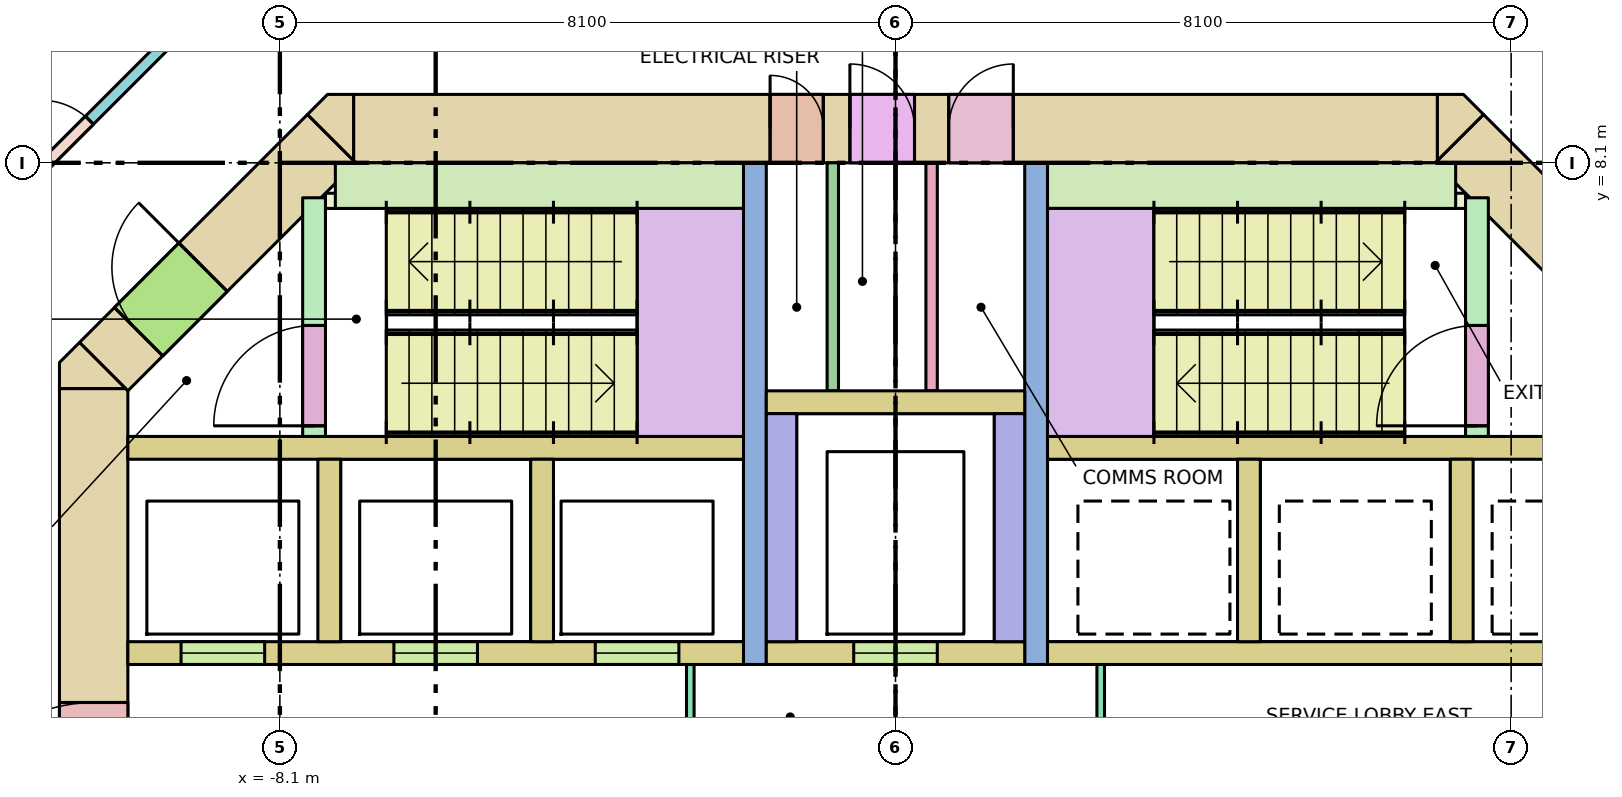
"""IFC4 building model, lengths in metres.
Left out: names, types, materials, properties, quantities, classifications, styles, units other than length and angle.
Written with IfcOpenShell. Run it as: python <this file> out.ifc"""

import sys

from ifc_helpers import new_model, si_unit, direction, frame, frame_2d, origin, place, context, subcontext, project, spatial, polyline, rectangle, outline, extrude, element, fill, save


model = new_model("IFC4")
c1 = context("Model", 3, precision=1e-05, world=origin(), true_north=direction((0.0, 1.0)))
c2 = subcontext(c1, "Body", "Model", "MODEL_VIEW")
j1 = project(units=[si_unit("LENGTHUNIT", "METRE"), si_unit("PLANEANGLEUNIT", "RADIAN")], contexts=[c1])
p1 = place(None, origin())
s1 = spatial("IfcSite", under=j1, at=p1, CompositionType="ELEMENT")
p2 = place(p1, origin())
s2 = spatial("IfcBuilding", under=s1, at=p2, CompositionType="ELEMENT")
p3 = place(p2, frame((0.0, 0.0, 39.0)))
s3 = spatial("IfcBuildingStorey", under=s2, at=p3, CompositionType="ELEMENT", Elevation=39.0)
p4 = place(p3, frame((-7.13, 8.55, -0.28), z_axis=(0.0, 0.0, 1.0), x_axis=(1.0, 0.0, 0.0)))
e1 = element("IfcWall", 1, at=p4, inside=s3, PredefinedType="SHEAR", context=c2, shape_type="SweptSolid", body=[
    extrude(rectangle(XDim=14.26, YDim=0.9, at=frame_2d((7.13, 0.0))), origin(), (0.0, 0.0, 1.0), 4.0),
])
p5 = place(p4, frame((5.48, 0.0, 0.28)))
e2 = element("IfcOpeningElement", 2, at=p5, cuts=e1, PredefinedType="OPENING", context=c2, shape_type="SweptSolid", body=[
    extrude(rectangle(XDim=0.7, YDim=2.1, at=frame_2d((0.35, 1.05))), frame((0.0, 0.46, 0.0), z_axis=(0.0, -1.0, 0.0), x_axis=(1.0, 0.0, 0.0)), (0.0, 0.0, 1.0), 0.92),
])
p6 = place(p4, frame((6.53, 0.0, 0.28)))
e3 = element("IfcOpeningElement", 3, at=p6, cuts=e1, PredefinedType="OPENING", context=c2, shape_type="SweptSolid", body=[
    extrude(rectangle(XDim=0.85, YDim=2.1, at=frame_2d((0.425, 1.05))), frame((0.0, 0.46, 0.0), z_axis=(0.0, -1.0, 0.0), x_axis=(1.0, 0.0, 0.0)), (0.0, 0.0, 1.0), 0.92),
])
p7 = place(p4, frame((7.83, 0.0, 0.28)))
e4 = element("IfcOpeningElement", 4, at=p7, cuts=e1, PredefinedType="OPENING", context=c2, shape_type="SweptSolid", body=[
    extrude(rectangle(XDim=0.85, YDim=2.1, at=frame_2d((0.425, 1.05))), frame((0.0, 0.46, 0.0), z_axis=(0.0, -1.0, 0.0), x_axis=(1.0, 0.0, 0.0)), (0.0, 0.0, 1.0), 0.92),
])
p8 = place(p3, frame((-10.55, -5.13, -0.28), z_axis=(0.0, 0.0, 1.0), x_axis=(0.0, 1.0, 0.0)))
e5 = element("IfcWall", 5, at=p8, inside=s3, PredefinedType="SHEAR", context=c2, shape_type="SweptSolid", body=[
    extrude(rectangle(XDim=10.26, YDim=0.9, at=frame_2d((5.13, 0.0))), origin(), (0.0, 0.0, 1.0), 4.0),
])
p9 = place(p8, frame((4.13, 0.0, 0.28)))
e6 = element("IfcOpeningElement", 6, at=p9, cuts=e5, PredefinedType="OPENING", context=c2, shape_type="SweptSolid", body=[
    extrude(rectangle(XDim=2.0, YDim=2.1, at=frame_2d((1.0, 1.05))), frame((0.0, 0.46, 0.0), z_axis=(0.0, -1.0, 0.0), x_axis=(1.0, 0.0, 0.0)), (0.0, 0.0, 1.0), 0.92),
])
p10 = place(p3, frame((-10.418, 5.418, -0.28), z_axis=(0.0, 0.0, 1.0), x_axis=(0.707106781187, 0.707106781187, 0.0)))
e7 = element("IfcWall", 7, at=p10, inside=s3, PredefinedType="SHEAR", context=c2, shape_type="SweptSolid", body=[
    extrude(rectangle(XDim=4.243, YDim=0.9, at=frame_2d((2.121, 0.0))), origin(), (0.0, 0.0, 1.0), 4.0),
])
p11 = place(p10, frame((0.65, 0.0, 0.28)))
e8 = element("IfcOpeningElement", 8, at=p11, cuts=e7, PredefinedType="OPENING", context=c2, shape_type="SweptSolid", body=[
    extrude(rectangle(XDim=1.2, YDim=2.1, at=frame_2d((0.6, 1.05))), frame((0.0, 0.46, 0.0), z_axis=(0.0, -1.0, 0.0), x_axis=(1.0, 0.0, 0.0)), (0.0, 0.0, 1.0), 0.92),
])
p12 = place(p3, frame((7.418, 8.418, -0.28), z_axis=(0.0, 0.0, 1.0), x_axis=(0.707106781187, -0.707106781187, 0.0)))
e9 = element("IfcWall", 9, at=p12, inside=s3, PredefinedType="SHEAR", context=c2, shape_type="SweptSolid", body=[
    extrude(rectangle(XDim=4.243, YDim=0.9, at=frame_2d((2.121, 0.0))), origin(), (0.0, 0.0, 1.0), 4.0),
])
p13 = place(p12, frame((2.393, 0.0, 0.28)))
e10 = element("IfcOpeningElement", 10, at=p13, cuts=e9, PredefinedType="OPENING", context=c2, shape_type="SweptSolid", body=[
    extrude(rectangle(XDim=1.2, YDim=2.1, at=frame_2d((0.6, 1.05))), frame((0.0, 0.46, 0.0), z_axis=(0.0, -1.0, 0.0), x_axis=(1.0, 0.0, 0.0)), (0.0, 0.0, 1.0), 0.92),
])
p14 = place(p3, frame((0.0, 0.0, -0.28)))
e11 = element("IfcWall", 11, at=p14, inside=s3, PredefinedType="SHEAR", context=c2, shape_type="SweptSolid", body=[
    extrude(outline(polyline([(-10.736, 5.736), (-10.13, 5.13), (-11.0, 5.13), (-11.0, 5.473), (-10.736, 5.736)])), origin(), (0.0, 0.0, 1.0), 4.0),
])
p15 = place(p3, frame((0.0, 0.0, -0.28)))
e12 = element("IfcWall", 12, at=p15, inside=s3, PredefinedType="SHEAR", context=c2, shape_type="SweptSolid", body=[
    extrude(outline(polyline([(-7.473, 9.0), (-7.13, 9.0), (-7.13, 8.13), (-7.736, 8.736), (-7.473, 9.0)])), origin(), (0.0, 0.0, 1.0), 4.0),
])
p16 = place(p3, frame((0.0, 0.0, -0.28)))
e13 = element("IfcWall", 13, at=p16, inside=s3, PredefinedType="SHEAR", context=c2, shape_type="SweptSolid", body=[
    extrude(outline(polyline([(7.473, 9.0), (7.736, 8.736), (7.13, 8.13), (7.13, 9.0), (7.473, 9.0)])), origin(), (0.0, 0.0, 1.0), 4.0),
])
for number, where, z_axis, x_axis in (
    (14, (-10.1, 4.35, 0.0), (0.0, 0.0, 1.0), (1.0, 0.0, 0.0)),
    (15, (2.0, 4.35, 0.0), (0.0, 0.0, 1.0), (1.0, 0.0, 0.0)),
):
    element("IfcWall", number, at=place(p3, frame(where, z_axis=z_axis, x_axis=x_axis)), inside=s3, PredefinedType="SOLIDWALL", context=c2, shape_type="SweptSolid", body=[
        extrude(rectangle(XDim=8.1, YDim=0.3, at=frame_2d((4.05, 0.0))), origin(), (0.0, 0.0, 1.0), 3.72),
    ])
p17 = place(p3, frame((-10.1, 1.65, 0.0), z_axis=(0.0, 0.0, 1.0), x_axis=(1.0, 0.0, 0.0)))
e16 = element("IfcWall", 16, at=p17, inside=s3, PredefinedType="SOLIDWALL", context=c2, shape_type="SweptSolid", body=[
    extrude(rectangle(XDim=8.1, YDim=0.3, at=frame_2d((4.05, 0.0))), origin(), (0.0, 0.0, 1.0), 3.72),
])
p18 = place(p17, frame((0.7, 0.0, 0.0)))
e17 = element("IfcOpeningElement", 17, at=p18, cuts=e16, PredefinedType="OPENING", context=c2, shape_type="SweptSolid", body=[
    extrude(rectangle(XDim=1.1, YDim=2.1, at=frame_2d((0.55, 1.05))), frame((0.0, 0.16, 0.0), z_axis=(0.0, -1.0, 0.0), x_axis=(1.0, 0.0, 0.0)), (0.0, 0.0, 1.0), 0.32),
])
p19 = place(p17, frame((3.5, 0.0, 0.0)))
e18 = element("IfcOpeningElement", 18, at=p19, cuts=e16, PredefinedType="OPENING", context=c2, shape_type="SweptSolid", body=[
    extrude(rectangle(XDim=1.1, YDim=2.1, at=frame_2d((0.55, 1.05))), frame((0.0, 0.16, 0.0), z_axis=(0.0, -1.0, 0.0), x_axis=(1.0, 0.0, 0.0)), (0.0, 0.0, 1.0), 0.32),
])
p20 = place(p17, frame((6.15, 0.0, 0.0)))
e19 = element("IfcOpeningElement", 19, at=p20, cuts=e16, PredefinedType="OPENING", context=c2, shape_type="SweptSolid", body=[
    extrude(rectangle(XDim=1.1, YDim=2.1, at=frame_2d((0.55, 1.05))), frame((0.0, 0.16, 0.0), z_axis=(0.0, -1.0, 0.0), x_axis=(1.0, 0.0, 0.0)), (0.0, 0.0, 1.0), 0.32),
])
p21 = place(p3, frame((2.0, 1.65, 0.0), z_axis=(0.0, 0.0, 1.0), x_axis=(1.0, 0.0, 0.0)))
e20 = element("IfcWall", 20, at=p21, inside=s3, PredefinedType="SOLIDWALL", context=c2, shape_type="SweptSolid", body=[
    extrude(rectangle(XDim=8.1, YDim=0.3, at=frame_2d((4.05, 0.0))), origin(), (0.0, 0.0, 1.0), 3.72),
])
for number, where, z_axis, x_axis in (
    (21, (-7.45, 1.8, 0.0), (0.0, 0.0, 1.0), (0.0, 1.0, 0.0)),
    (22, (-4.65, 1.8, 0.0), (0.0, 0.0, 1.0), (0.0, 1.0, 0.0)),
    (23, (4.65, 1.8, 0.0), (0.0, 0.0, 1.0), (0.0, 1.0, 0.0)),
    (24, (7.45, 1.8, 0.0), (0.0, 0.0, 1.0), (0.0, 1.0, 0.0)),
):
    element("IfcWall", number, at=place(p3, frame(where, z_axis=z_axis, x_axis=x_axis)), inside=s3, PredefinedType="SOLIDWALL", context=c2, shape_type="SweptSolid", body=[
        extrude(rectangle(XDim=2.4, YDim=0.3, at=frame_2d((1.2, 0.0))), origin(), (0.0, 0.0, 1.0), 3.72),
    ])
for number, where, z_axis, x_axis in (
    (25, (-1.85, 1.5, 0.0), (0.0, 0.0, 1.0), (0.0, 1.0, 0.0)),
    (26, (1.85, 1.5, 0.0), (0.0, 0.0, 1.0), (0.0, 1.0, 0.0)),
):
    element("IfcWall", number, at=place(p3, frame(where, z_axis=z_axis, x_axis=x_axis)), inside=s3, PredefinedType="SHEAR", context=c2, shape_type="SweptSolid", body=[
        extrude(rectangle(XDim=6.6, YDim=0.3, at=frame_2d((3.3, 0.0))), origin(), (0.0, 0.0, 1.0), 3.72),
    ])
p22 = place(p3, frame((-1.7, 1.65, 0.0), z_axis=(0.0, 0.0, 1.0), x_axis=(1.0, 0.0, 0.0)))
e27 = element("IfcWall", 27, at=p22, inside=s3, PredefinedType="SOLIDWALL", context=c2, shape_type="SweptSolid", body=[
    extrude(rectangle(XDim=3.4, YDim=0.3, at=frame_2d((1.7, 0.0))), origin(), (0.0, 0.0, 1.0), 3.72),
])
p23 = place(p22, frame((1.15, 0.0, 0.0)))
e28 = element("IfcOpeningElement", 28, at=p23, cuts=e27, PredefinedType="OPENING", context=c2, shape_type="SweptSolid", body=[
    extrude(rectangle(XDim=1.1, YDim=2.1, at=frame_2d((0.55, 1.05))), frame((0.0, 0.16, 0.0), z_axis=(0.0, -1.0, 0.0), x_axis=(1.0, 0.0, 0.0)), (0.0, 0.0, 1.0), 0.32),
])
for number, where, z_axis, x_axis in (
    (29, (-1.5, 1.8, 0.0), (0.0, 0.0, 1.0), (0.0, 1.0, 0.0)),
    (30, (1.5, 1.8, 0.0), (0.0, 0.0, 1.0), (0.0, 1.0, 0.0)),
):
    element("IfcWall", number, at=place(p3, frame(where, z_axis=z_axis, x_axis=x_axis)), inside=s3, PredefinedType="SOLIDWALL", context=c2, shape_type="SweptSolid", body=[
        extrude(rectangle(XDim=3.0, YDim=0.4, at=frame_2d((1.5, 0.0))), origin(), (0.0, 0.0, 1.0), 3.72),
    ])
p24 = place(p3, frame((-1.7, 4.95, 0.0), z_axis=(0.0, 0.0, 1.0), x_axis=(1.0, 0.0, 0.0)))
e31 = element("IfcWall", 31, at=p24, inside=s3, PredefinedType="SOLIDWALL", context=c2, shape_type="SweptSolid", body=[
    extrude(rectangle(XDim=3.4, YDim=0.3, at=frame_2d((1.7, 0.0))), origin(), (0.0, 0.0, 1.0), 3.72),
])
p25 = place(p3, frame((-7.65, 4.5, 0.0), z_axis=(0.0, 0.0, 1.0), x_axis=(0.0, 1.0, 0.0)))
e32 = element("IfcWall", 32, at=p25, inside=s3, PredefinedType="SHEAR", context=c2, shape_type="SweptSolid", body=[
    extrude(rectangle(XDim=3.14, YDim=0.3, at=frame_2d((1.57, 0.0))), origin(), (0.0, 0.0, 1.0), 3.72),
])
p26 = place(p25, frame((0.14, 0.0, 0.0)))
e33 = element("IfcOpeningElement", 33, at=p26, cuts=e32, PredefinedType="OPENING", context=c2, shape_type="SweptSolid", body=[
    extrude(rectangle(XDim=1.32, YDim=2.1, at=frame_2d((0.66, 1.05))), frame((0.0, 0.16, 0.0), z_axis=(0.0, -1.0, 0.0), x_axis=(1.0, 0.0, 0.0)), (0.0, 0.0, 1.0), 0.32),
])
p27 = place(p3, frame((-7.37, 7.8, 0.0), z_axis=(0.0, 0.0, 1.0), x_axis=(1.0, 0.0, 0.0)))
e34 = element("IfcWall", 34, at=p27, inside=s3, PredefinedType="SHEAR", context=c2, shape_type="SweptSolid", body=[
    extrude(rectangle(XDim=5.37, YDim=0.6, at=frame_2d((2.685, 0.0))), origin(), (0.0, 0.0, 1.0), 3.72),
])
p28 = place(p3, frame((7.65, 4.5, 0.0), z_axis=(0.0, 0.0, 1.0), x_axis=(0.0, 1.0, 0.0)))
e35 = element("IfcWall", 35, at=p28, inside=s3, PredefinedType="SHEAR", context=c2, shape_type="SweptSolid", body=[
    extrude(rectangle(XDim=3.14, YDim=0.3, at=frame_2d((1.57, 0.0))), origin(), (0.0, 0.0, 1.0), 3.72),
])
p29 = place(p28, frame((0.14, 0.0, 0.0)))
e36 = element("IfcOpeningElement", 36, at=p29, cuts=e35, PredefinedType="OPENING", context=c2, shape_type="SweptSolid", body=[
    extrude(rectangle(XDim=1.32, YDim=2.1, at=frame_2d((0.66, 1.05))), frame((0.0, 0.16, 0.0), z_axis=(0.0, -1.0, 0.0), x_axis=(1.0, 0.0, 0.0)), (0.0, 0.0, 1.0), 0.32),
])
p30 = place(p3, frame((2.0, 7.8, 0.0), z_axis=(0.0, 0.0, 1.0), x_axis=(1.0, 0.0, 0.0)))
e37 = element("IfcWall", 37, at=p30, inside=s3, PredefinedType="SHEAR", context=c2, shape_type="SweptSolid", body=[
    extrude(rectangle(XDim=5.37, YDim=0.6, at=frame_2d((2.685, 0.0))), origin(), (0.0, 0.0, 1.0), 3.72),
])
for number, where, z_axis, x_axis in (
    (38, (-7.5, 7.6, 0.0), (0.0, 0.0, 1.0), (1.0, 0.0, 0.0)),
    (39, (6.9, 7.6, 0.0), (0.0, 0.0, 1.0), (1.0, 0.0, 0.0)),
):
    element("IfcWall", number, at=place(p3, frame(where, z_axis=z_axis, x_axis=x_axis)), inside=s3, PredefinedType="SHEAR", context=c2, shape_type="SweptSolid", body=[
        extrude(rectangle(XDim=0.6, YDim=0.2, at=frame_2d((0.3, 0.0))), origin(), (0.0, 0.0, 1.0), 3.72),
    ])
p31 = place(p3, frame((-2.7, -1.5, 0.0), z_axis=(0.0, 0.0, 1.0), x_axis=(0.0, 1.0, 0.0)))
e40 = element("IfcWall", 40, at=p31, inside=s3, PredefinedType="PARTITIONING", context=c2, shape_type="SweptSolid", body=[
    extrude(rectangle(XDim=3.0, YDim=0.1, at=frame_2d((1.5, 0.0))), origin(), (0.0, 0.0, 1.0), 3.72),
])
p32 = place(p31, frame((0.9, 0.0, 0.0)))
e41 = element("IfcOpeningElement", 41, at=p32, cuts=e40, PredefinedType="OPENING", context=c2, shape_type="SweptSolid", body=[
    extrude(rectangle(XDim=1.2, YDim=2.1, at=frame_2d((0.6, 1.05))), frame((0.0, 0.06, 0.0), z_axis=(0.0, -1.0, 0.0), x_axis=(1.0, 0.0, 0.0)), (0.0, 0.0, 1.0), 0.12),
])
p33 = place(p3, frame((2.7, -1.5, 0.0), z_axis=(0.0, 0.0, 1.0), x_axis=(0.0, 1.0, 0.0)))
e42 = element("IfcWall", 42, at=p33, inside=s3, PredefinedType="PARTITIONING", context=c2, shape_type="SweptSolid", body=[
    extrude(rectangle(XDim=3.0, YDim=0.1, at=frame_2d((1.5, 0.0))), origin(), (0.0, 0.0, 1.0), 3.72),
])
p34 = place(p33, frame((0.9, 0.0, 0.0)))
e43 = element("IfcOpeningElement", 43, at=p34, cuts=e42, PredefinedType="OPENING", context=c2, shape_type="SweptSolid", body=[
    extrude(rectangle(XDim=1.2, YDim=2.1, at=frame_2d((0.6, 1.05))), frame((0.0, 0.06, 0.0), z_axis=(0.0, -1.0, 0.0), x_axis=(1.0, 0.0, 0.0)), (0.0, 0.0, 1.0), 0.12),
])
for number, where, z_axis, x_axis in (
    (44, (-0.825, 5.1, 0.0), (0.0, 0.0, 1.0), (0.0, 1.0, 0.0)),
    (45, (0.475, 5.1, 0.0), (0.0, 0.0, 1.0), (0.0, 1.0, 0.0)),
):
    element("IfcWall", number, at=place(p3, frame(where, z_axis=z_axis, x_axis=x_axis)), inside=s3, PredefinedType="PARTITIONING", context=c2, shape_type="SweptSolid", body=[
        extrude(rectangle(XDim=3.0, YDim=0.15, at=frame_2d((1.5, 0.0))), origin(), (0.0, 0.0, 1.0), 3.72),
    ])
p35 = place(p3, frame((-12.975, 6.291, 0.0), z_axis=(0.0, 0.0, 1.0), x_axis=(0.707125355289, 0.707088206597, 0.0)))
e46 = element("IfcWall", 46, at=p35, inside=s3, PredefinedType="PARTITIONING", context=c2, shape_type="SweptSolid", body=[
    extrude(rectangle(XDim=6.572, YDim=0.15, at=frame_2d((3.286, 0.0))), origin(), (0.0, 0.0, 1.0), 2.82),
])
p36 = place(p35, frame((2.45, 0.0, 0.0)))
e47 = element("IfcOpeningElement", 47, at=p36, cuts=e46, PredefinedType="OPENING", context=c2, shape_type="SweptSolid", body=[
    extrude(rectangle(XDim=0.9, YDim=2.1, at=frame_2d((0.45, 1.05))), frame((0.0, 0.085, 0.0), z_axis=(0.0, -1.0, 0.0), x_axis=(1.0, 0.0, 0.0)), (0.0, 0.0, 1.0), 0.17),
])
p37 = place(p3, frame((8.328, 10.938, 0.0), z_axis=(0.0, 0.0, 1.0), x_axis=(0.707106781187, -0.707106781187, 0.0)))
e48 = element("IfcWall", 48, at=p37, inside=s3, PredefinedType="PARTITIONING", context=c2, shape_type="SweptSolid", body=[
    extrude(rectangle(XDim=5.496, YDim=0.15, at=frame_2d((2.748, 0.0))), origin(), (0.0, 0.0, 1.0), 2.82),
])
p38 = place(p37, frame((3.196, 0.0, 0.0)))
e49 = element("IfcOpeningElement", 49, at=p38, cuts=e48, PredefinedType="OPENING", context=c2, shape_type="SweptSolid", body=[
    extrude(rectangle(XDim=0.9, YDim=2.1, at=frame_2d((0.45, 1.05))), frame((0.0, 0.085, 0.0), z_axis=(0.0, -1.0, 0.0), x_axis=(1.0, 0.0, 0.0)), (0.0, 0.0, 1.0), 0.17),
])
p39 = place(p18, origin())
e50 = element("IfcDoor", 50, at=p39, inside=s3, OperationType="DOUBLE_DOOR_SLIDING", PredefinedType="DOOR", context=c2, shape_type="SweptSolid", body=[
    extrude(rectangle(XDim=1.1, YDim=2.1, at=frame_2d((0.55, 1.05))), frame((0.0, 0.025, 0.0), z_axis=(0.0, -1.0, 0.0), x_axis=(1.0, 0.0, 0.0)), (0.0, 0.0, 1.0), 0.05),
])
fill(e17, e50)
p40 = place(p19, origin())
e51 = element("IfcDoor", 51, at=p40, inside=s3, OperationType="DOUBLE_DOOR_SLIDING", PredefinedType="DOOR", context=c2, shape_type="SweptSolid", body=[
    extrude(rectangle(XDim=1.1, YDim=2.1, at=frame_2d((0.55, 1.05))), frame((0.0, 0.025, 0.0), z_axis=(0.0, -1.0, 0.0), x_axis=(1.0, 0.0, 0.0)), (0.0, 0.0, 1.0), 0.05),
])
fill(e18, e51)
p41 = place(p20, origin())
e52 = element("IfcDoor", 52, at=p41, inside=s3, OperationType="DOUBLE_DOOR_SLIDING", PredefinedType="DOOR", context=c2, shape_type="SweptSolid", body=[
    extrude(rectangle(XDim=1.1, YDim=2.1, at=frame_2d((0.55, 1.05))), frame((0.0, 0.025, 0.0), z_axis=(0.0, -1.0, 0.0), x_axis=(1.0, 0.0, 0.0)), (0.0, 0.0, 1.0), 0.05),
])
fill(e19, e52)
p42 = place(p23, origin())
e53 = element("IfcDoor", 53, at=p42, inside=s3, OperationType="DOUBLE_DOOR_SLIDING", PredefinedType="DOOR", context=c2, shape_type="SweptSolid", body=[
    extrude(rectangle(XDim=1.1, YDim=2.1, at=frame_2d((0.55, 1.05))), frame((0.0, 0.025, 0.0), z_axis=(0.0, -1.0, 0.0), x_axis=(1.0, 0.0, 0.0)), (0.0, 0.0, 1.0), 0.05),
])
fill(e28, e53)
p43 = place(p26, origin())
e54 = element("IfcDoor", 54, at=p43, inside=s3, OperationType="DOUBLE_DOOR_SINGLE_SWING", PredefinedType="DOOR", context=c2, shape_type="SweptSolid", body=[
    extrude(rectangle(XDim=1.32, YDim=2.1, at=frame_2d((0.66, 1.05))), frame((0.0, 0.025, 0.0), z_axis=(0.0, -1.0, 0.0), x_axis=(1.0, 0.0, 0.0)), (0.0, 0.0, 1.0), 0.05),
])
fill(e33, e54)
p44 = place(p11, origin())
e55 = element("IfcDoor", 55, at=p44, inside=s3, OperationType="SINGLE_SWING_RIGHT", PredefinedType="DOOR", context=c2, shape_type="SweptSolid", body=[
    extrude(rectangle(XDim=1.2, YDim=2.1, at=frame_2d((0.6, 1.05))), frame((0.0, 0.025, 0.0), z_axis=(0.0, -1.0, 0.0), x_axis=(1.0, 0.0, 0.0)), (0.0, 0.0, 1.0), 0.05),
])
fill(e8, e55)
p45 = place(p29, origin())
e56 = element("IfcDoor", 56, at=p45, inside=s3, OperationType="DOUBLE_DOOR_SINGLE_SWING", PredefinedType="DOOR", context=c2, shape_type="SweptSolid", body=[
    extrude(rectangle(XDim=1.32, YDim=2.1, at=frame_2d((0.66, 1.05))), frame((0.0, 0.025, 0.0), z_axis=(0.0, -1.0, 0.0), x_axis=(1.0, 0.0, 0.0)), (0.0, 0.0, 1.0), 0.05),
])
fill(e36, e56)
p46 = place(p9, origin())
e57 = element("IfcDoor", 57, at=p46, inside=s3, OperationType="DOUBLE_DOOR_SINGLE_SWING", PredefinedType="DOOR", context=c2, shape_type="SweptSolid", body=[
    extrude(rectangle(XDim=2.0, YDim=2.1, at=frame_2d((1.0, 1.05))), frame((0.0, 0.025, 0.0), z_axis=(0.0, -1.0, 0.0), x_axis=(1.0, 0.0, 0.0)), (0.0, 0.0, 1.0), 0.05),
])
fill(e6, e57)
p47 = place(p5, origin())
e58 = element("IfcDoor", 58, at=p47, inside=s3, OperationType="SINGLE_SWING_LEFT", PredefinedType="DOOR", context=c2, shape_type="SweptSolid", body=[
    extrude(rectangle(XDim=0.7, YDim=2.1, at=frame_2d((0.35, 1.05))), frame((0.0, 0.025, 0.0), z_axis=(0.0, -1.0, 0.0), x_axis=(1.0, 0.0, 0.0)), (0.0, 0.0, 1.0), 0.05),
])
fill(e2, e58)
p48 = place(p6, origin())
e59 = element("IfcDoor", 59, at=p48, inside=s3, OperationType="SINGLE_SWING_LEFT", PredefinedType="DOOR", context=c2, shape_type="SweptSolid", body=[
    extrude(rectangle(XDim=0.85, YDim=2.1, at=frame_2d((0.425, 1.05))), frame((0.0, 0.025, 0.0), z_axis=(0.0, -1.0, 0.0), x_axis=(1.0, 0.0, 0.0)), (0.0, 0.0, 1.0), 0.05),
])
fill(e3, e59)
p49 = place(p7, origin())
e60 = element("IfcDoor", 60, at=p49, inside=s3, OperationType="SINGLE_SWING_RIGHT", PredefinedType="DOOR", context=c2, shape_type="SweptSolid", body=[
    extrude(rectangle(XDim=0.85, YDim=2.1, at=frame_2d((0.425, 1.05))), frame((0.0, 0.025, 0.0), z_axis=(0.0, -1.0, 0.0), x_axis=(1.0, 0.0, 0.0)), (0.0, 0.0, 1.0), 0.05),
])
fill(e4, e60)
p50 = place(p36, origin())
e61 = element("IfcDoor", 61, at=p50, inside=s3, OperationType="SINGLE_SWING_LEFT", PredefinedType="DOOR", context=c2, shape_type="SweptSolid", body=[
    extrude(rectangle(XDim=0.9, YDim=2.1, at=frame_2d((0.45, 1.05))), frame((0.0, 0.025, 0.0), z_axis=(0.0, -1.0, 0.0), x_axis=(1.0, 0.0, 0.0)), (0.0, 0.0, 1.0), 0.05),
])
fill(e47, e61)
save(model, sys.argv[1])
